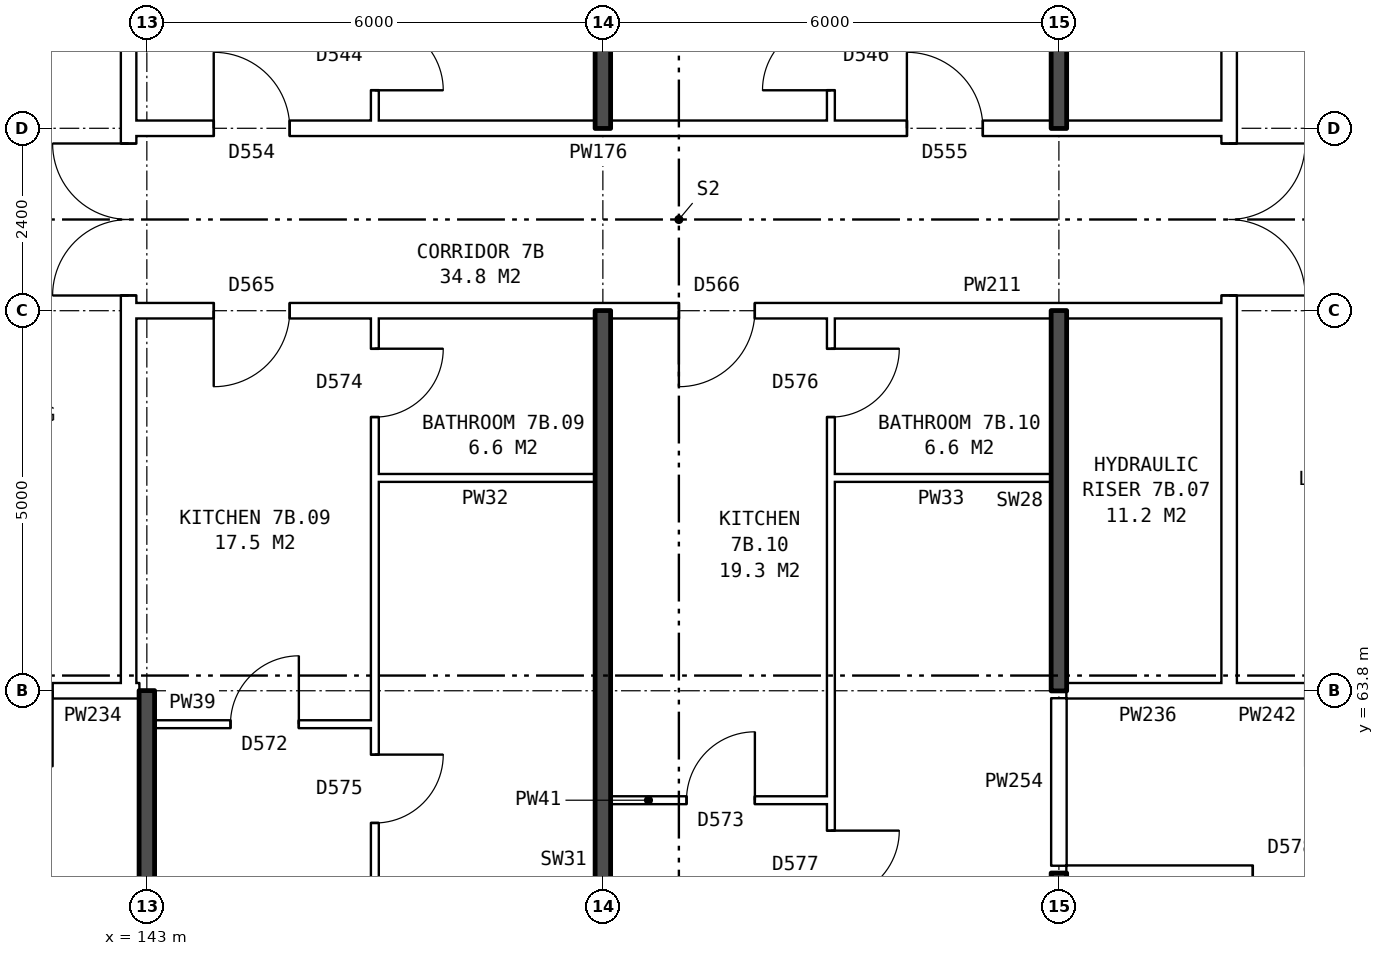
"""IFC4 building model, lengths in metres.
Left out: names, types, materials, properties, quantities, classifications, styles, units other than length and angle.
Written with IfcOpenShell. Run it as: python <this file> out.ifc"""

import sys

from ifc_helpers import new_model, si_unit, direction, frame, frame_2d, origin, place, context, subcontext, project, spatial, rectangle, extrude, element, fill, save


model = new_model("IFC4")
c1 = context("Model", 3, precision=1e-05, world=origin(), true_north=direction((0.0, 1.0)))
c2 = subcontext(c1, "Body", "Model", "MODEL_VIEW")
j1 = project(units=[si_unit("LENGTHUNIT", "METRE"), si_unit("PLANEANGLEUNIT", "RADIAN")], contexts=[c1])
p1 = place(None, origin())
s1 = spatial("IfcSite", under=j1, at=p1, CompositionType="ELEMENT")
p2 = place(p1, origin())
s2 = spatial("IfcBuilding", under=s1, at=p2, CompositionType="ELEMENT")
p3 = place(p2, frame((0.0, 0.0, 28.8)))
s3 = spatial("IfcBuildingStorey", under=s2, at=p3, CompositionType="ELEMENT", Elevation=28.8)
p4 = place(p3, frame((142.76, 63.9, 0.0), z_axis=(0.0, 0.0, 1.0), x_axis=(0.0, 1.0, 0.0)))
e1 = element("IfcWall", 1, at=p4, inside=s3, PredefinedType="PARTITIONING", context=c2, shape_type="SweptSolid", body=[
    extrude(rectangle(XDim=12.2, YDim=0.2, at=frame_2d((6.1, 0.0))), origin(), (0.0, 0.0, 1.0), 2.85),
])
p5 = place(p4, frame((5.1, 0.0, 0.0)))
e2 = element("IfcOpeningElement", 2, at=p5, cuts=e1, PredefinedType="OPENING", context=c2, shape_type="SweptSolid", body=[
    extrude(rectangle(XDim=2.0, YDim=2.1, at=frame_2d((1.0, 1.05))), frame((0.0, 0.11, 0.0), z_axis=(0.0, -1.0, 0.0), x_axis=(1.0, 0.0, 0.0)), (0.0, 0.0, 1.0), 0.22),
])
p6 = place(p3, frame((157.24, 63.9, 0.0), z_axis=(0.0, 0.0, 1.0), x_axis=(0.0, 1.0, 0.0)))
e3 = element("IfcWall", 3, at=p6, inside=s3, PredefinedType="PARTITIONING", context=c2, shape_type="SweptSolid", body=[
    extrude(rectangle(XDim=12.2, YDim=0.2, at=frame_2d((6.1, 0.0))), origin(), (0.0, 0.0, 1.0), 2.85),
])
p7 = place(p6, frame((5.1, 0.0, 0.0)))
e4 = element("IfcOpeningElement", 4, at=p7, cuts=e3, PredefinedType="OPENING", context=c2, shape_type="SweptSolid", body=[
    extrude(rectangle(XDim=2.0, YDim=2.1, at=frame_2d((1.0, 1.05))), frame((0.0, 0.11, 0.0), z_axis=(0.0, -1.0, 0.0), x_axis=(1.0, 0.0, 0.0)), (0.0, 0.0, 1.0), 0.22),
])
p8 = place(p3, frame((155.1, 61.4, 0.0), z_axis=(0.0, 0.0, 1.0), x_axis=(1.0, 0.0, 0.0)))
e5 = element("IfcWall", 5, at=p8, inside=s3, PredefinedType="PARTITIONING", context=c2, shape_type="SweptSolid", body=[
    extrude(rectangle(XDim=22.29, YDim=0.2, at=frame_2d((11.145, 0.0))), origin(), (0.0, 0.0, 1.0), 2.85),
])
p9 = place(p8, frame((2.45, 0.0, 0.0)))
e6 = element("IfcOpeningElement", 6, at=p9, cuts=e5, PredefinedType="OPENING", context=c2, shape_type="SweptSolid", body=[
    extrude(rectangle(XDim=1.0, YDim=2.1, at=frame_2d((0.5, 1.05))), frame((0.0, 0.11, 0.0), z_axis=(0.0, -1.0, 0.0), x_axis=(1.0, 0.0, 0.0)), (0.0, 0.0, 1.0), 0.22),
])
p10 = place(p8, frame((14.4, 0.0, 0.0)))
e7 = element("IfcOpeningElement", 7, at=p10, cuts=e5, PredefinedType="OPENING", context=c2, shape_type="SweptSolid", body=[
    extrude(rectangle(XDim=1.0, YDim=2.1, at=frame_2d((0.5, 1.05))), frame((0.0, 0.11, 0.0), z_axis=(0.0, -1.0, 0.0), x_axis=(1.0, 0.0, 0.0)), (0.0, 0.0, 1.0), 0.22),
])
p11 = place(p3, frame((149.1, 62.36, 0.0), z_axis=(0.0, 0.0, 1.0), x_axis=(1.0, 0.0, 0.0)))
e8 = element("IfcWall", 8, at=p11, inside=s3, PredefinedType="PARTITIONING", context=c2, shape_type="SweptSolid", body=[
    extrude(rectangle(XDim=2.9, YDim=0.1, at=frame_2d((1.45, 0.0))), origin(), (0.0, 0.0, 1.0), 2.85),
])
p12 = place(p11, frame((1.0, 0.0, 0.0)))
e9 = element("IfcOpeningElement", 9, at=p12, cuts=e8, PredefinedType="OPENING", context=c2, shape_type="SweptSolid", body=[
    extrude(rectangle(XDim=0.9, YDim=2.1, at=frame_2d((0.45, 1.05))), frame((0.0, 0.06, 0.0), z_axis=(0.0, -1.0, 0.0), x_axis=(1.0, 0.0, 0.0)), (0.0, 0.0, 1.0), 0.12),
])
p13 = place(p3, frame((143.1, 63.36, 0.0), z_axis=(0.0, 0.0, 1.0), x_axis=(1.0, 0.0, 0.0)))
e10 = element("IfcWall", 10, at=p13, inside=s3, PredefinedType="PARTITIONING", context=c2, shape_type="SweptSolid", body=[
    extrude(rectangle(XDim=2.9, YDim=0.1, at=frame_2d((1.45, 0.0))), origin(), (0.0, 0.0, 1.0), 2.85),
])
p14 = place(p13, frame((1.0, 0.0, 0.0)))
e11 = element("IfcOpeningElement", 11, at=p14, cuts=e10, PredefinedType="OPENING", context=c2, shape_type="SweptSolid", body=[
    extrude(rectangle(XDim=0.9, YDim=2.1, at=frame_2d((0.45, 1.05))), frame((0.0, 0.06, 0.0), z_axis=(0.0, -1.0, 0.0), x_axis=(1.0, 0.0, 0.0)), (0.0, 0.0, 1.0), 0.12),
])
p15 = place(p3, frame((139.76, 63.8, 0.0), z_axis=(0.0, 0.0, 1.0), x_axis=(1.0, 0.0, 0.0)))
e12 = element("IfcWall", 12, at=p15, inside=s3, PredefinedType="PARTITIONING", context=c2, shape_type="SweptSolid", body=[
    extrude(rectangle(XDim=3.0, YDim=0.2, at=frame_2d((1.5, 0.0))), origin(), (0.0, 0.0, 1.0), 2.85),
])
p16 = place(p15, frame((1.0, 0.0, 0.0)))
e13 = element("IfcOpeningElement", 13, at=p16, cuts=e12, PredefinedType="OPENING", context=c2, shape_type="SweptSolid", body=[
    extrude(rectangle(XDim=1.0, YDim=2.1, at=frame_2d((0.5, 1.05))), frame((0.0, 0.11, 0.0), z_axis=(0.0, -1.0, 0.0), x_axis=(1.0, 0.0, 0.0)), (0.0, 0.0, 1.0), 0.22),
])
p17 = place(p3, frame((142.76, 63.8, 0.0), z_axis=(0.0, 0.0, 1.0), x_axis=(1.0, 0.0, 0.0)))
e14 = element("IfcWall", 14, at=p17, inside=s3, PredefinedType="PARTITIONING", context=c2, shape_type="SweptSolid", body=[
    extrude(rectangle(XDim=0.14, YDim=0.2, at=frame_2d((0.07, 0.0))), origin(), (0.0, 0.0, 1.0), 2.85),
])
p18 = place(p3, frame((155.1, 63.8, 0.0), z_axis=(0.0, 0.0, 1.0), x_axis=(1.0, 0.0, 0.0)))
e15 = element("IfcWall", 15, at=p18, inside=s3, PredefinedType="PARTITIONING", context=c2, shape_type="SweptSolid", body=[
    extrude(rectangle(XDim=2.14, YDim=0.2, at=frame_2d((1.07, 0.0))), origin(), (0.0, 0.0, 1.0), 2.85),
])
p19 = place(p3, frame((157.24, 63.8, 0.0), z_axis=(0.0, 0.0, 1.0), x_axis=(1.0, 0.0, 0.0)))
e16 = element("IfcWall", 16, at=p19, inside=s3, PredefinedType="PARTITIONING", context=c2, shape_type="SweptSolid", body=[
    extrude(rectangle(XDim=3.0, YDim=0.2, at=frame_2d((1.5, 0.0))), origin(), (0.0, 0.0, 1.0), 2.85),
])
p20 = place(p19, frame((1.0, 0.0, 0.0)))
e17 = element("IfcOpeningElement", 17, at=p20, cuts=e16, PredefinedType="OPENING", context=c2, shape_type="SweptSolid", body=[
    extrude(rectangle(XDim=1.0, YDim=2.1, at=frame_2d((0.5, 1.05))), frame((0.0, 0.11, 0.0), z_axis=(0.0, -1.0, 0.0), x_axis=(1.0, 0.0, 0.0)), (0.0, 0.0, 1.0), 0.22),
])
for number, where, z_axis, x_axis in (
    (18, (146.0, 66.6, 0.0), (0.0, 0.0, 1.0), (1.0, 0.0, 0.0)),
    (19, (152.0, 66.6, 0.0), (0.0, 0.0, 1.0), (1.0, 0.0, 0.0)),
):
    element("IfcWall", number, at=place(p3, frame(where, z_axis=z_axis, x_axis=x_axis)), inside=s3, PredefinedType="PARTITIONING", context=c2, shape_type="SweptSolid", body=[
        extrude(rectangle(XDim=2.9, YDim=0.1, at=frame_2d((1.45, 0.0))), origin(), (0.0, 0.0, 1.0), 2.85),
    ])
p21 = place(p3, frame((142.76, 68.8, 0.0), z_axis=(0.0, 0.0, 1.0), x_axis=(1.0, 0.0, 0.0)))
e20 = element("IfcWall", 20, at=p21, inside=s3, PredefinedType="PARTITIONING", context=c2, shape_type="SweptSolid", body=[
    extrude(rectangle(XDim=14.48, YDim=0.2, at=frame_2d((7.24, 0.0))), origin(), (0.0, 0.0, 1.0), 2.85),
])
p22 = place(p21, frame((1.12, 0.0, 0.0)))
e21 = element("IfcOpeningElement", 21, at=p22, cuts=e20, PredefinedType="OPENING", context=c2, shape_type="SweptSolid", body=[
    extrude(rectangle(XDim=1.0, YDim=2.1, at=frame_2d((0.5, 1.05))), frame((0.0, 0.11, 0.0), z_axis=(0.0, -1.0, 0.0), x_axis=(1.0, 0.0, 0.0)), (0.0, 0.0, 1.0), 0.22),
])
p23 = place(p21, frame((7.24, 0.0, 0.0)))
e22 = element("IfcOpeningElement", 22, at=p23, cuts=e20, PredefinedType="OPENING", context=c2, shape_type="SweptSolid", body=[
    extrude(rectangle(XDim=1.0, YDim=2.1, at=frame_2d((0.5, 1.05))), frame((0.0, 0.11, 0.0), z_axis=(0.0, -1.0, 0.0), x_axis=(1.0, 0.0, 0.0)), (0.0, 0.0, 1.0), 0.22),
])
p24 = place(p3, frame((142.76, 71.2, 0.0), z_axis=(0.0, 0.0, 1.0), x_axis=(1.0, 0.0, 0.0)))
e23 = element("IfcWall", 23, at=p24, inside=s3, PredefinedType="PARTITIONING", context=c2, shape_type="SweptSolid", body=[
    extrude(rectangle(XDim=14.48, YDim=0.2, at=frame_2d((7.24, 0.0))), origin(), (0.0, 0.0, 1.0), 2.85),
])
p25 = place(p24, frame((1.12, 0.0, 0.0)))
e24 = element("IfcOpeningElement", 24, at=p25, cuts=e23, PredefinedType="OPENING", context=c2, shape_type="SweptSolid", body=[
    extrude(rectangle(XDim=1.0, YDim=2.1, at=frame_2d((0.5, 1.05))), frame((0.0, 0.11, 0.0), z_axis=(0.0, -1.0, 0.0), x_axis=(1.0, 0.0, 0.0)), (0.0, 0.0, 1.0), 0.22),
])
p26 = place(p24, frame((10.24, 0.0, 0.0)))
e25 = element("IfcOpeningElement", 25, at=p26, cuts=e23, PredefinedType="OPENING", context=c2, shape_type="SweptSolid", body=[
    extrude(rectangle(XDim=1.0, YDim=2.1, at=frame_2d((0.5, 1.05))), frame((0.0, 0.11, 0.0), z_axis=(0.0, -1.0, 0.0), x_axis=(1.0, 0.0, 0.0)), (0.0, 0.0, 1.0), 0.22),
])
p27 = place(p3, frame((143.0, 54.36, 0.0), z_axis=(0.0, 0.0, 1.0), x_axis=(0.0, 1.0, 0.0)))
e26 = element("IfcWall", 26, at=p27, inside=s3, PredefinedType="SOLIDWALL", context=c2, shape_type="SweptSolid", body=[
    extrude(rectangle(XDim=9.44, YDim=0.2, at=frame_2d((4.72, 0.0))), origin(), (0.0, 0.0, 1.0), 2.85),
])
p28 = place(p3, frame((146.0, 54.36, 0.0), z_axis=(0.0, 0.0, 1.0), x_axis=(0.0, 1.0, 0.0)))
e27 = element("IfcWall", 27, at=p28, inside=s3, PredefinedType="PARTITIONING", context=c2, shape_type="SweptSolid", body=[
    extrude(rectangle(XDim=14.34, YDim=0.1, at=frame_2d((7.17, 0.0))), origin(), (0.0, 0.0, 1.0), 2.85),
])
p29 = place(p28, frame((7.7, 0.0, 0.0)))
e28 = element("IfcOpeningElement", 28, at=p29, cuts=e27, PredefinedType="OPENING", context=c2, shape_type="SweptSolid", body=[
    extrude(rectangle(XDim=0.9, YDim=2.1, at=frame_2d((0.45, 1.05))), frame((0.0, 0.06, 0.0), z_axis=(0.0, -1.0, 0.0), x_axis=(1.0, 0.0, 0.0)), (0.0, 0.0, 1.0), 0.12),
])
p30 = place(p28, frame((13.04, 0.0, 0.0)))
e29 = element("IfcOpeningElement", 29, at=p30, cuts=e27, PredefinedType="OPENING", context=c2, shape_type="SweptSolid", body=[
    extrude(rectangle(XDim=0.9, YDim=2.1, at=frame_2d((0.45, 1.05))), frame((0.0, 0.06, 0.0), z_axis=(0.0, -1.0, 0.0), x_axis=(1.0, 0.0, 0.0)), (0.0, 0.0, 1.0), 0.12),
])
p31 = place(p3, frame((146.0, 71.3, 0.0), z_axis=(0.0, 0.0, 1.0), x_axis=(0.0, 1.0, 0.0)))
e30 = element("IfcWall", 30, at=p31, inside=s3, PredefinedType="PARTITIONING", context=c2, shape_type="SweptSolid", body=[
    extrude(rectangle(XDim=14.34, YDim=0.1, at=frame_2d((7.17, 0.0))), origin(), (0.0, 0.0, 1.0), 2.85),
])
p32 = place(p31, frame((5.74, 0.0, 0.0)))
e31 = element("IfcOpeningElement", 31, at=p32, cuts=e30, PredefinedType="OPENING", context=c2, shape_type="SweptSolid", body=[
    extrude(rectangle(XDim=0.9, YDim=2.1, at=frame_2d((0.45, 1.05))), frame((0.0, 0.06, 0.0), z_axis=(0.0, -1.0, 0.0), x_axis=(1.0, 0.0, 0.0)), (0.0, 0.0, 1.0), 0.12),
])
p33 = place(p31, frame((0.4, 0.0, 0.0)))
e32 = element("IfcOpeningElement", 32, at=p33, cuts=e30, PredefinedType="OPENING", context=c2, shape_type="SweptSolid", body=[
    extrude(rectangle(XDim=0.9, YDim=2.1, at=frame_2d((0.45, 1.05))), frame((0.0, 0.06, 0.0), z_axis=(0.0, -1.0, 0.0), x_axis=(1.0, 0.0, 0.0)), (0.0, 0.0, 1.0), 0.12),
])
for number, where, z_axis, x_axis in (
    (33, (149.0, 54.36, 0.0), (0.0, 0.0, 1.0), (0.0, 1.0, 0.0)),
    (34, (149.0, 71.2, 0.0), (0.0, 0.0, 1.0), (0.0, 1.0, 0.0)),
):
    element("IfcWall", number, at=place(p3, frame(where, z_axis=z_axis, x_axis=x_axis)), inside=s3, PredefinedType="SOLIDWALL", context=c2, shape_type="SweptSolid", body=[
        extrude(rectangle(XDim=14.44, YDim=0.2, at=frame_2d((7.22, 0.0))), origin(), (0.0, 0.0, 1.0), 2.85),
    ])
p34 = place(p3, frame((152.0, 54.36, 0.0), z_axis=(0.0, 0.0, 1.0), x_axis=(0.0, 1.0, 0.0)))
e35 = element("IfcWall", 35, at=p34, inside=s3, PredefinedType="PARTITIONING", context=c2, shape_type="SweptSolid", body=[
    extrude(rectangle(XDim=14.34, YDim=0.1, at=frame_2d((7.17, 0.0))), origin(), (0.0, 0.0, 1.0), 2.85),
])
p35 = place(p34, frame((6.7, 0.0, 0.0)))
e36 = element("IfcOpeningElement", 36, at=p35, cuts=e35, PredefinedType="OPENING", context=c2, shape_type="SweptSolid", body=[
    extrude(rectangle(XDim=0.9, YDim=2.1, at=frame_2d((0.45, 1.05))), frame((0.0, 0.06, 0.0), z_axis=(0.0, -1.0, 0.0), x_axis=(1.0, 0.0, 0.0)), (0.0, 0.0, 1.0), 0.12),
])
p36 = place(p34, frame((13.04, 0.0, 0.0)))
e37 = element("IfcOpeningElement", 37, at=p36, cuts=e35, PredefinedType="OPENING", context=c2, shape_type="SweptSolid", body=[
    extrude(rectangle(XDim=0.9, YDim=2.1, at=frame_2d((0.45, 1.05))), frame((0.0, 0.06, 0.0), z_axis=(0.0, -1.0, 0.0), x_axis=(1.0, 0.0, 0.0)), (0.0, 0.0, 1.0), 0.12),
])
p37 = place(p3, frame((152.0, 71.3, 0.0), z_axis=(0.0, 0.0, 1.0), x_axis=(0.0, 1.0, 0.0)))
e38 = element("IfcWall", 38, at=p37, inside=s3, PredefinedType="PARTITIONING", context=c2, shape_type="SweptSolid", body=[
    extrude(rectangle(XDim=14.34, YDim=0.1, at=frame_2d((7.17, 0.0))), origin(), (0.0, 0.0, 1.0), 2.85),
])
p38 = place(p37, frame((7.94, 0.0, 0.0)))
e39 = element("IfcOpeningElement", 39, at=p38, cuts=e38, PredefinedType="OPENING", context=c2, shape_type="SweptSolid", body=[
    extrude(rectangle(XDim=0.9, YDim=2.1, at=frame_2d((0.45, 1.05))), frame((0.0, 0.06, 0.0), z_axis=(0.0, -1.0, 0.0), x_axis=(1.0, 0.0, 0.0)), (0.0, 0.0, 1.0), 0.12),
])
p39 = place(p37, frame((0.4, 0.0, 0.0)))
e40 = element("IfcOpeningElement", 40, at=p39, cuts=e38, PredefinedType="OPENING", context=c2, shape_type="SweptSolid", body=[
    extrude(rectangle(XDim=0.9, YDim=2.1, at=frame_2d((0.45, 1.05))), frame((0.0, 0.06, 0.0), z_axis=(0.0, -1.0, 0.0), x_axis=(1.0, 0.0, 0.0)), (0.0, 0.0, 1.0), 0.12),
])
p40 = place(p3, frame((155.0, 54.36, 0.0), z_axis=(0.0, 0.0, 1.0), x_axis=(0.0, 1.0, 0.0)))
e41 = element("IfcWall", 41, at=p40, inside=s3, PredefinedType="SOLIDWALL", context=c2, shape_type="SweptSolid", body=[
    extrude(rectangle(XDim=7.04, YDim=0.2, at=frame_2d((3.52, 0.0))), origin(), (0.0, 0.0, 1.0), 2.85),
])
p41 = place(p3, frame((155.0, 61.5, 0.0), z_axis=(0.0, 0.0, 1.0), x_axis=(0.0, 1.0, 0.0)))
e42 = element("IfcWall", 42, at=p41, inside=s3, PredefinedType="PARTITIONING", context=c2, shape_type="SweptSolid", body=[
    extrude(rectangle(XDim=2.2, YDim=0.2, at=frame_2d((1.1, 0.0))), origin(), (0.0, 0.0, 1.0), 2.85),
])
for number, where, z_axis, x_axis in (
    (43, (155.0, 63.8, 0.0), (0.0, 0.0, 1.0), (0.0, 1.0, 0.0)),
    (44, (155.0, 71.2, 0.0), (0.0, 0.0, 1.0), (0.0, 1.0, 0.0)),
):
    element("IfcWall", number, at=place(p3, frame(where, z_axis=z_axis, x_axis=x_axis)), inside=s3, PredefinedType="SOLIDWALL", context=c2, shape_type="SweptSolid", body=[
        extrude(rectangle(XDim=5.0, YDim=0.2, at=frame_2d((2.5, 0.0))), origin(), (0.0, 0.0, 1.0), 2.85),
    ])
p42 = place(p5, origin())
e45 = element("IfcDoor", 45, at=p42, inside=s3, OperationType="DOUBLE_DOOR_SINGLE_SWING", PredefinedType="DOOR", context=c2, shape_type="SweptSolid", body=[
    extrude(rectangle(XDim=2.0, YDim=2.1, at=frame_2d((1.0, 1.05))), frame((0.0, 0.025, 0.0), z_axis=(0.0, -1.0, 0.0), x_axis=(1.0, 0.0, 0.0)), (0.0, 0.0, 1.0), 0.05),
])
fill(e2, e45)
p43 = place(p7, frame((2.0, 0.0, 0.0), z_axis=(0.0, 0.0, 1.0), x_axis=(-1.0, 0.0, 0.0)))
e46 = element("IfcDoor", 46, at=p43, inside=s3, OperationType="DOUBLE_DOOR_SINGLE_SWING", PredefinedType="DOOR", context=c2, shape_type="SweptSolid", body=[
    extrude(rectangle(XDim=2.0, YDim=2.1, at=frame_2d((1.0, 1.05))), frame((0.0, 0.025, 0.0), z_axis=(0.0, -1.0, 0.0), x_axis=(1.0, 0.0, 0.0)), (0.0, 0.0, 1.0), 0.05),
])
fill(e4, e46)
p44 = place(p29, frame((0.9, 0.0, 0.0), z_axis=(0.0, 0.0, 1.0), x_axis=(-1.0, 0.0, 0.0)))
e47 = element("IfcDoor", 47, at=p44, inside=s3, OperationType="SINGLE_SWING_LEFT", PredefinedType="DOOR", context=c2, shape_type="SweptSolid", body=[
    extrude(rectangle(XDim=0.9, YDim=2.1, at=frame_2d((0.45, 1.05))), frame((0.0, 0.025, 0.0), z_axis=(0.0, -1.0, 0.0), x_axis=(1.0, 0.0, 0.0)), (0.0, 0.0, 1.0), 0.05),
])
fill(e28, e47)
p45 = place(p22, frame((1.0, 0.0, 0.0), z_axis=(0.0, 0.0, 1.0), x_axis=(-1.0, 0.0, 0.0)))
e48 = element("IfcDoor", 48, at=p45, inside=s3, OperationType="SINGLE_SWING_RIGHT", PredefinedType="DOOR", context=c2, shape_type="SweptSolid", body=[
    extrude(rectangle(XDim=1.0, YDim=2.1, at=frame_2d((0.5, 1.05))), frame((0.0, 0.025, 0.0), z_axis=(0.0, -1.0, 0.0), x_axis=(1.0, 0.0, 0.0)), (0.0, 0.0, 1.0), 0.05),
])
fill(e21, e48)
p46 = place(p14, origin())
e49 = element("IfcDoor", 49, at=p46, inside=s3, OperationType="SINGLE_SWING_RIGHT", PredefinedType="DOOR", context=c2, shape_type="SweptSolid", body=[
    extrude(rectangle(XDim=0.9, YDim=2.1, at=frame_2d((0.45, 1.05))), frame((0.0, 0.025, 0.0), z_axis=(0.0, -1.0, 0.0), x_axis=(1.0, 0.0, 0.0)), (0.0, 0.0, 1.0), 0.05),
])
fill(e11, e49)
p47 = place(p30, frame((0.9, 0.0, 0.0), z_axis=(0.0, 0.0, 1.0), x_axis=(-1.0, 0.0, 0.0)))
e50 = element("IfcDoor", 50, at=p47, inside=s3, OperationType="SINGLE_SWING_LEFT", PredefinedType="DOOR", context=c2, shape_type="SweptSolid", body=[
    extrude(rectangle(XDim=0.9, YDim=2.1, at=frame_2d((0.45, 1.05))), frame((0.0, 0.025, 0.0), z_axis=(0.0, -1.0, 0.0), x_axis=(1.0, 0.0, 0.0)), (0.0, 0.0, 1.0), 0.05),
])
fill(e29, e50)
p48 = place(p35, frame((0.9, 0.0, 0.0), z_axis=(0.0, 0.0, 1.0), x_axis=(-1.0, 0.0, 0.0)))
e51 = element("IfcDoor", 51, at=p48, inside=s3, OperationType="SINGLE_SWING_LEFT", PredefinedType="DOOR", context=c2, shape_type="SweptSolid", body=[
    extrude(rectangle(XDim=0.9, YDim=2.1, at=frame_2d((0.45, 1.05))), frame((0.0, 0.025, 0.0), z_axis=(0.0, -1.0, 0.0), x_axis=(1.0, 0.0, 0.0)), (0.0, 0.0, 1.0), 0.05),
])
fill(e36, e51)
p49 = place(p23, frame((1.0, 0.0, 0.0), z_axis=(0.0, 0.0, 1.0), x_axis=(-1.0, 0.0, 0.0)))
e52 = element("IfcDoor", 52, at=p49, inside=s3, OperationType="SINGLE_SWING_RIGHT", PredefinedType="DOOR", context=c2, shape_type="SweptSolid", body=[
    extrude(rectangle(XDim=1.0, YDim=2.1, at=frame_2d((0.5, 1.05))), frame((0.0, 0.025, 0.0), z_axis=(0.0, -1.0, 0.0), x_axis=(1.0, 0.0, 0.0)), (0.0, 0.0, 1.0), 0.05),
])
fill(e22, e52)
p50 = place(p12, origin())
e53 = element("IfcDoor", 53, at=p50, inside=s3, OperationType="SINGLE_SWING_RIGHT", PredefinedType="DOOR", context=c2, shape_type="SweptSolid", body=[
    extrude(rectangle(XDim=0.9, YDim=2.1, at=frame_2d((0.45, 1.05))), frame((0.0, 0.025, 0.0), z_axis=(0.0, -1.0, 0.0), x_axis=(1.0, 0.0, 0.0)), (0.0, 0.0, 1.0), 0.05),
])
fill(e9, e53)
p51 = place(p36, frame((0.9, 0.0, 0.0), z_axis=(0.0, 0.0, 1.0), x_axis=(-1.0, 0.0, 0.0)))
e54 = element("IfcDoor", 54, at=p51, inside=s3, OperationType="SINGLE_SWING_LEFT", PredefinedType="DOOR", context=c2, shape_type="SweptSolid", body=[
    extrude(rectangle(XDim=0.9, YDim=2.1, at=frame_2d((0.45, 1.05))), frame((0.0, 0.025, 0.0), z_axis=(0.0, -1.0, 0.0), x_axis=(1.0, 0.0, 0.0)), (0.0, 0.0, 1.0), 0.05),
])
fill(e37, e54)
p52 = place(p25, origin())
e55 = element("IfcDoor", 55, at=p52, inside=s3, OperationType="SINGLE_SWING_LEFT", PredefinedType="DOOR", context=c2, shape_type="SweptSolid", body=[
    extrude(rectangle(XDim=1.0, YDim=2.1, at=frame_2d((0.5, 1.05))), frame((0.0, 0.025, 0.0), z_axis=(0.0, -1.0, 0.0), x_axis=(1.0, 0.0, 0.0)), (0.0, 0.0, 1.0), 0.05),
])
fill(e24, e55)
p53 = place(p33, frame((0.9, 0.0, 0.0), z_axis=(0.0, 0.0, 1.0), x_axis=(-1.0, 0.0, 0.0)))
e56 = element("IfcDoor", 56, at=p53, inside=s3, OperationType="SINGLE_SWING_RIGHT", PredefinedType="DOOR", context=c2, shape_type="SweptSolid", body=[
    extrude(rectangle(XDim=0.9, YDim=2.1, at=frame_2d((0.45, 1.05))), frame((0.0, 0.025, 0.0), z_axis=(0.0, -1.0, 0.0), x_axis=(1.0, 0.0, 0.0)), (0.0, 0.0, 1.0), 0.05),
])
fill(e32, e56)
p54 = place(p26, origin())
e57 = element("IfcDoor", 57, at=p54, inside=s3, OperationType="SINGLE_SWING_LEFT", PredefinedType="DOOR", context=c2, shape_type="SweptSolid", body=[
    extrude(rectangle(XDim=1.0, YDim=2.1, at=frame_2d((0.5, 1.05))), frame((0.0, 0.025, 0.0), z_axis=(0.0, -1.0, 0.0), x_axis=(1.0, 0.0, 0.0)), (0.0, 0.0, 1.0), 0.05),
])
fill(e25, e57)
p55 = place(p39, origin())
e58 = element("IfcDoor", 58, at=p55, inside=s3, OperationType="SINGLE_SWING_LEFT", PredefinedType="DOOR", context=c2, shape_type="SweptSolid", body=[
    extrude(rectangle(XDim=0.9, YDim=2.1, at=frame_2d((0.45, 1.05))), frame((0.0, 0.025, 0.0), z_axis=(0.0, -1.0, 0.0), x_axis=(1.0, 0.0, 0.0)), (0.0, 0.0, 1.0), 0.05),
])
fill(e40, e58)
p56 = place(p9, frame((1.0, 0.0, 0.0), z_axis=(0.0, 0.0, 1.0), x_axis=(-1.0, 0.0, 0.0)))
e59 = element("IfcDoor", 59, at=p56, inside=s3, OperationType="SINGLE_SWING_LEFT", PredefinedType="DOOR", context=c2, shape_type="SweptSolid", body=[
    extrude(rectangle(XDim=1.0, YDim=2.1, at=frame_2d((0.5, 1.05))), frame((0.0, 0.025, 0.0), z_axis=(0.0, -1.0, 0.0), x_axis=(1.0, 0.0, 0.0)), (0.0, 0.0, 1.0), 0.05),
])
fill(e6, e59)
save(model, sys.argv[1])
